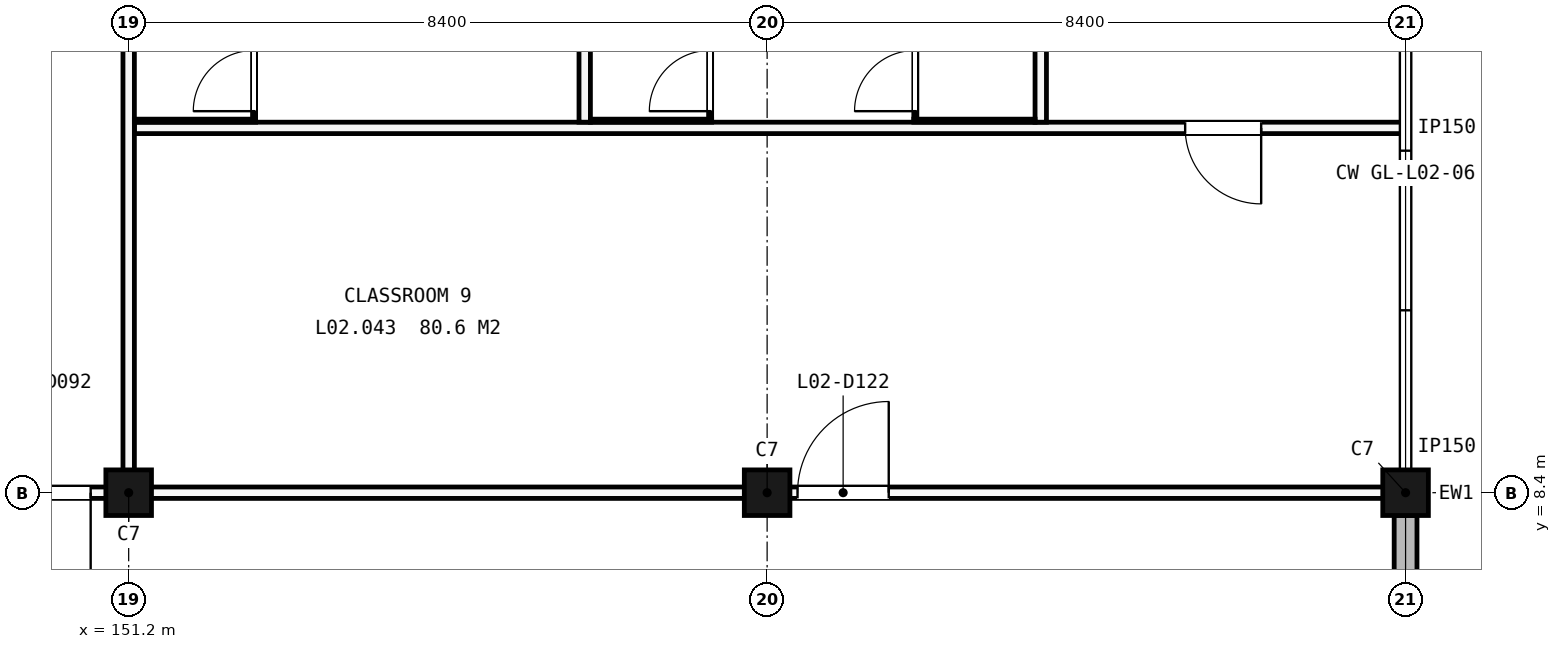
"""IFC4 building model, lengths in metres.
Left out: names, types, materials, properties, quantities, classifications, styles, units other than length and angle.
Written with IfcOpenShell. Run it as: python <this file> out.ifc"""

import sys

from ifc_helpers import new_model, si_unit, direction, frame, frame_2d, origin, origin_2d, place, context, subcontext, project, spatial, rectangle, extrude, element, fill, save


model = new_model("IFC4")
c1 = context("Model", 3, precision=1e-05, world=origin(), true_north=direction((0.0, 1.0)))
c2 = subcontext(c1, "Body", "Model", "MODEL_VIEW")
j1 = project(units=[si_unit("LENGTHUNIT", "METRE"), si_unit("PLANEANGLEUNIT", "RADIAN")], contexts=[c1])
p1 = place(None, origin())
s1 = spatial("IfcSite", under=j1, at=p1, CompositionType="ELEMENT")
p2 = place(p1, origin())
s2 = spatial("IfcBuilding", under=s1, at=p2, CompositionType="ELEMENT")
p3 = place(p2, frame((0.0, 0.0, 9.9)))
s3 = spatial("IfcBuildingStorey", under=s2, at=p3, CompositionType="ELEMENT", Elevation=9.9)
for number, where, z_axis, x_axis in (
    (1, (151.2, 8.4, -0.25), (0.0, 0.0, 1.0), (1.0, 0.0, 0.0)),
    (2, (159.6, 8.4, -0.25), (0.0, 0.0, 1.0), (1.0, 0.0, 0.0)),
    (3, (168.0, 8.4, -0.25), (0.0, 0.0, 1.0), (1.0, 0.0, 0.0)),
):
    element("IfcColumn", number, at=place(p3, frame(where, z_axis=z_axis, x_axis=x_axis)), inside=s3, PredefinedType="COLUMN", context=c2, shape_type="SweptSolid", body=[
        extrude(rectangle(XDim=0.6, YDim=0.6, at=origin_2d()), origin(), (0.0, 0.0, 1.0), 4.45),
    ])
p4 = place(p3, frame((168.0, 0.225, 0.0), z_axis=(0.0, 0.0, 1.0), x_axis=(0.0, 1.0, 0.0)))
e4 = element("IfcWall", 4, at=p4, inside=s3, PredefinedType="STANDARD", context=c2, shape_type="SweptSolid", body=[
    extrude(rectangle(XDim=7.875, YDim=0.3, at=frame_2d((3.938, 0.0))), origin(), (0.0, 0.0, 1.0), 3.55),
])
p5 = place(p3, frame((92.2, 8.4, 0.0), z_axis=(0.0, 0.0, 1.0), x_axis=(1.0, 0.0, 0.0)))
e5 = element("IfcWall", 5, at=p5, inside=s3, PredefinedType="PARTITIONING", context=c2, shape_type="SweptSolid", body=[
    extrude(rectangle(XDim=75.8, YDim=0.15, at=frame_2d((37.9, 0.0))), origin(), (0.0, 0.0, 1.0), 3.4),
])
p6 = place(p5, frame((0.6, 0.0, 0.0)))
e6 = element("IfcOpeningElement", 6, at=p6, cuts=e5, PredefinedType="OPENING", context=c2, shape_type="SweptSolid", body=[
    extrude(rectangle(XDim=2.1, YDim=2.1, at=frame_2d((1.05, 1.05))), frame((0.0, 0.085, 0.0), z_axis=(0.0, -1.0, 0.0), x_axis=(1.0, 0.0, 0.0)), (0.0, 0.0, 1.0), 0.17),
])
p7 = place(p5, frame((22.9, 0.0, 0.0)))
e7 = element("IfcOpeningElement", 7, at=p7, cuts=e5, PredefinedType="OPENING", context=c2, shape_type="SweptSolid", body=[
    extrude(rectangle(XDim=2.1, YDim=2.1, at=frame_2d((1.05, 1.05))), frame((0.0, 0.085, 0.0), z_axis=(0.0, -1.0, 0.0), x_axis=(1.0, 0.0, 0.0)), (0.0, 0.0, 1.0), 0.17),
])
p8 = place(p5, frame((25.8, 0.0, 0.0)))
e8 = element("IfcOpeningElement", 8, at=p8, cuts=e5, PredefinedType="OPENING", context=c2, shape_type="SweptSolid", body=[
    extrude(rectangle(XDim=1.2, YDim=2.1, at=frame_2d((0.6, 1.05))), frame((0.0, 0.085, 0.0), z_axis=(0.0, -1.0, 0.0), x_axis=(1.0, 0.0, 0.0)), (0.0, 0.0, 1.0), 0.17),
])
p9 = place(p5, frame((40.5, 0.0, 0.0)))
e9 = element("IfcOpeningElement", 9, at=p9, cuts=e5, PredefinedType="OPENING", context=c2, shape_type="SweptSolid", body=[
    extrude(rectangle(XDim=1.2, YDim=2.1, at=frame_2d((0.6, 1.05))), frame((0.0, 0.085, 0.0), z_axis=(0.0, -1.0, 0.0), x_axis=(1.0, 0.0, 0.0)), (0.0, 0.0, 1.0), 0.17),
])
p10 = place(p5, frame((42.7, 0.0, 0.0)))
e10 = element("IfcOpeningElement", 10, at=p10, cuts=e5, PredefinedType="OPENING", context=c2, shape_type="SweptSolid", body=[
    extrude(rectangle(XDim=1.2, YDim=2.1, at=frame_2d((0.6, 1.05))), frame((0.0, 0.085, 0.0), z_axis=(0.0, -1.0, 0.0), x_axis=(1.0, 0.0, 0.0)), (0.0, 0.0, 1.0), 0.17),
])
p11 = place(p5, frame((57.3, 0.0, 0.0)))
e11 = element("IfcOpeningElement", 11, at=p11, cuts=e5, PredefinedType="OPENING", context=c2, shape_type="SweptSolid", body=[
    extrude(rectangle(XDim=1.2, YDim=2.1, at=frame_2d((0.6, 1.05))), frame((0.0, 0.085, 0.0), z_axis=(0.0, -1.0, 0.0), x_axis=(1.0, 0.0, 0.0)), (0.0, 0.0, 1.0), 0.17),
])
p12 = place(p5, frame((67.8, 0.0, 0.0)))
e12 = element("IfcOpeningElement", 12, at=p12, cuts=e5, PredefinedType="OPENING", context=c2, shape_type="SweptSolid", body=[
    extrude(rectangle(XDim=1.2, YDim=2.1, at=frame_2d((0.6, 1.05))), frame((0.0, 0.085, 0.0), z_axis=(0.0, -1.0, 0.0), x_axis=(1.0, 0.0, 0.0)), (0.0, 0.0, 1.0), 0.17),
])
p13 = place(p3, frame((151.275, 13.2, 0.0), z_axis=(0.0, 0.0, 1.0), x_axis=(1.0, 0.0, 0.0)))
e13 = element("IfcWall", 13, at=p13, inside=s3, PredefinedType="PARTITIONING", context=c2, shape_type="SweptSolid", body=[
    extrude(rectangle(XDim=16.725, YDim=0.15, at=frame_2d((8.363, 0.0))), origin(), (0.0, 0.0, 1.0), 4.2),
])
p14 = place(p13, frame((13.825, 0.0, 0.0)))
e14 = element("IfcOpeningElement", 14, at=p14, cuts=e13, PredefinedType="OPENING", context=c2, shape_type="SweptSolid", body=[
    extrude(rectangle(XDim=1.0, YDim=2.1, at=frame_2d((0.5, 1.05))), frame((0.0, 0.085, 0.0), z_axis=(0.0, -1.0, 0.0), x_axis=(1.0, 0.0, 0.0)), (0.0, 0.0, 1.0), 0.17),
])
p15 = place(p3, frame((151.2, 8.475, 0.0), z_axis=(0.0, 0.0, 1.0), x_axis=(0.0, 1.0, 0.0)))
e15 = element("IfcWall", 15, at=p15, inside=s3, PredefinedType="PARTITIONING", context=c2, shape_type="SweptSolid", body=[
    extrude(rectangle(XDim=16.65, YDim=0.15, at=frame_2d((8.325, 0.0))), origin(), (0.0, 0.0, 1.0), 3.4),
])
p16 = place(p15, frame((14.925, 0.0, 0.0)))
e16 = element("IfcOpeningElement", 16, at=p16, cuts=e15, PredefinedType="OPENING", context=c2, shape_type="SweptSolid", body=[
    extrude(rectangle(XDim=1.2, YDim=2.1, at=frame_2d((0.6, 1.05))), frame((0.0, 0.085, 0.0), z_axis=(0.0, -1.0, 0.0), x_axis=(1.0, 0.0, 0.0)), (0.0, 0.0, 1.0), 0.17),
])
for number, where, z_axis, x_axis in (
    (17, (157.2, 13.275, 0.0), (0.0, 0.0, 1.0), (0.0, 1.0, 0.0)),
    (18, (163.2, 13.275, 0.0), (0.0, 0.0, 1.0), (0.0, 1.0, 0.0)),
):
    element("IfcWall", number, at=place(p3, frame(where, z_axis=z_axis, x_axis=x_axis)), inside=s3, PredefinedType="PARTITIONING", context=c2, shape_type="SweptSolid", body=[
        extrude(rectangle(XDim=9.45, YDim=0.15, at=frame_2d((4.725, 0.0))), origin(), (0.0, 0.0, 1.0), 4.2),
    ])
p17 = place(p3, frame((151.275, 13.295, 0.0), z_axis=(0.0, 0.0, 1.0), x_axis=(1.0, 0.0, 0.0)))
e19 = element("IfcWall", 19, at=p17, inside=s3, PredefinedType="PARTITIONING", context=c2, shape_type="SweptSolid", body=[
    extrude(rectangle(XDim=1.595, YDim=0.04, at=frame_2d((0.798, 0.0))), origin(), (0.0, 0.0, 1.0), 2.0),
])
p18 = place(p3, frame((152.85, 13.315, 0.0), z_axis=(0.0, 0.0, 1.0), x_axis=(0.0, 1.0, 0.0)))
e20 = element("IfcWall", 20, at=p18, inside=s3, PredefinedType="PARTITIONING", context=c2, shape_type="SweptSolid", body=[
    extrude(rectangle(XDim=0.955, YDim=0.04, at=frame_2d((0.478, 0.0))), origin(), (0.0, 0.0, 1.0), 2.0),
])
p19 = place(p18, frame((0.105, 0.0, 0.0)))
e21 = element("IfcOpeningElement", 21, at=p19, cuts=e20, PredefinedType="OPENING", context=c2, shape_type="SweptSolid", body=[
    extrude(rectangle(XDim=0.8, YDim=2.0, at=frame_2d((0.4, 1.0))), frame((0.0, 0.03, 0.0), z_axis=(0.0, -1.0, 0.0), x_axis=(1.0, 0.0, 0.0)), (0.0, 0.0, 1.0), 0.06),
])
p20 = place(p3, frame((157.275, 13.295, 0.0), z_axis=(0.0, 0.0, 1.0), x_axis=(1.0, 0.0, 0.0)))
e22 = element("IfcWall", 22, at=p20, inside=s3, PredefinedType="PARTITIONING", context=c2, shape_type="SweptSolid", body=[
    extrude(rectangle(XDim=1.595, YDim=0.04, at=frame_2d((0.798, 0.0))), origin(), (0.0, 0.0, 1.0), 2.0),
])
p21 = place(p3, frame((158.85, 13.315, 0.0), z_axis=(0.0, 0.0, 1.0), x_axis=(0.0, 1.0, 0.0)))
e23 = element("IfcWall", 23, at=p21, inside=s3, PredefinedType="PARTITIONING", context=c2, shape_type="SweptSolid", body=[
    extrude(rectangle(XDim=0.955, YDim=0.04, at=frame_2d((0.478, 0.0))), origin(), (0.0, 0.0, 1.0), 2.0),
])
p22 = place(p21, frame((0.105, 0.0, 0.0)))
e24 = element("IfcOpeningElement", 24, at=p22, cuts=e23, PredefinedType="OPENING", context=c2, shape_type="SweptSolid", body=[
    extrude(rectangle(XDim=0.8, YDim=2.0, at=frame_2d((0.4, 1.0))), frame((0.0, 0.03, 0.0), z_axis=(0.0, -1.0, 0.0), x_axis=(1.0, 0.0, 0.0)), (0.0, 0.0, 1.0), 0.06),
])
p23 = place(p3, frame((163.125, 13.295, 0.0), z_axis=(0.0, 0.0, 1.0), x_axis=(-1.0, 0.0, 0.0)))
e25 = element("IfcWall", 25, at=p23, inside=s3, PredefinedType="PARTITIONING", context=c2, shape_type="SweptSolid", body=[
    extrude(rectangle(XDim=1.595, YDim=0.04, at=frame_2d((0.797, 0.0))), origin(), (0.0, 0.0, 1.0), 2.0),
])
p24 = place(p3, frame((161.55, 13.315, 0.0), z_axis=(0.0, 0.0, 1.0), x_axis=(0.0, 1.0, 0.0)))
e26 = element("IfcWall", 26, at=p24, inside=s3, PredefinedType="PARTITIONING", context=c2, shape_type="SweptSolid", body=[
    extrude(rectangle(XDim=0.955, YDim=0.04, at=frame_2d((0.478, 0.0))), origin(), (0.0, 0.0, 1.0), 2.0),
])
p25 = place(p24, frame((0.105, 0.0, 0.0)))
e27 = element("IfcOpeningElement", 27, at=p25, cuts=e26, PredefinedType="OPENING", context=c2, shape_type="SweptSolid", body=[
    extrude(rectangle(XDim=0.8, YDim=2.0, at=frame_2d((0.4, 1.0))), frame((0.0, 0.03, 0.0), z_axis=(0.0, -1.0, 0.0), x_axis=(1.0, 0.0, 0.0)), (0.0, 0.0, 1.0), 0.06),
])
p26 = place(p11, origin())
e28 = element("IfcDoor", 28, at=p26, inside=s3, OperationType="SINGLE_SWING_RIGHT", PredefinedType="DOOR", context=c2, shape_type="SweptSolid", body=[
    extrude(rectangle(XDim=1.2, YDim=2.1, at=frame_2d((0.6, 1.05))), frame((0.0, 0.025, 0.0), z_axis=(0.0, -1.0, 0.0), x_axis=(1.0, 0.0, 0.0)), (0.0, 0.0, 1.0), 0.05),
])
fill(e11, e28)
p27 = place(p12, origin())
e29 = element("IfcDoor", 29, at=p27, inside=s3, OperationType="SINGLE_SWING_LEFT", PredefinedType="DOOR", context=c2, shape_type="SweptSolid", body=[
    extrude(rectangle(XDim=1.2, YDim=2.1, at=frame_2d((0.6, 1.05))), frame((0.0, 0.025, 0.0), z_axis=(0.0, -1.0, 0.0), x_axis=(1.0, 0.0, 0.0)), (0.0, 0.0, 1.0), 0.05),
])
fill(e12, e29)
p28 = place(p14, origin())
e30 = element("IfcDoor", 30, at=p28, inside=s3, OperationType="SINGLE_SWING_RIGHT", PredefinedType="DOOR", context=c2, shape_type="SweptSolid", body=[
    extrude(rectangle(XDim=1.0, YDim=2.1, at=frame_2d((0.5, 1.05))), frame((0.0, 0.025, 0.0), z_axis=(0.0, -1.0, 0.0), x_axis=(1.0, 0.0, 0.0)), (0.0, 0.0, 1.0), 0.05),
])
fill(e14, e30)
p29 = place(p19, origin())
e31 = element("IfcDoor", 31, at=p29, inside=s3, OperationType="SINGLE_SWING_LEFT", PredefinedType="DOOR", context=c2, shape_type="SweptSolid", body=[
    extrude(rectangle(XDim=0.8, YDim=2.0, at=frame_2d((0.4, 1.0))), frame((0.0, 0.02, 0.0), z_axis=(0.0, -1.0, 0.0), x_axis=(1.0, 0.0, 0.0)), (0.0, 0.0, 1.0), 0.04),
])
fill(e21, e31)
p30 = place(p22, origin())
e32 = element("IfcDoor", 32, at=p30, inside=s3, OperationType="SINGLE_SWING_LEFT", PredefinedType="DOOR", context=c2, shape_type="SweptSolid", body=[
    extrude(rectangle(XDim=0.8, YDim=2.0, at=frame_2d((0.4, 1.0))), frame((0.0, 0.02, 0.0), z_axis=(0.0, -1.0, 0.0), x_axis=(1.0, 0.0, 0.0)), (0.0, 0.0, 1.0), 0.04),
])
fill(e24, e32)
p31 = place(p25, origin())
e33 = element("IfcDoor", 33, at=p31, inside=s3, OperationType="SINGLE_SWING_LEFT", PredefinedType="DOOR", context=c2, shape_type="SweptSolid", body=[
    extrude(rectangle(XDim=0.8, YDim=2.0, at=frame_2d((0.4, 1.0))), frame((0.0, 0.02, 0.0), z_axis=(0.0, -1.0, 0.0), x_axis=(1.0, 0.0, 0.0)), (0.0, 0.0, 1.0), 0.04),
])
fill(e27, e33)
save(model, sys.argv[1])
